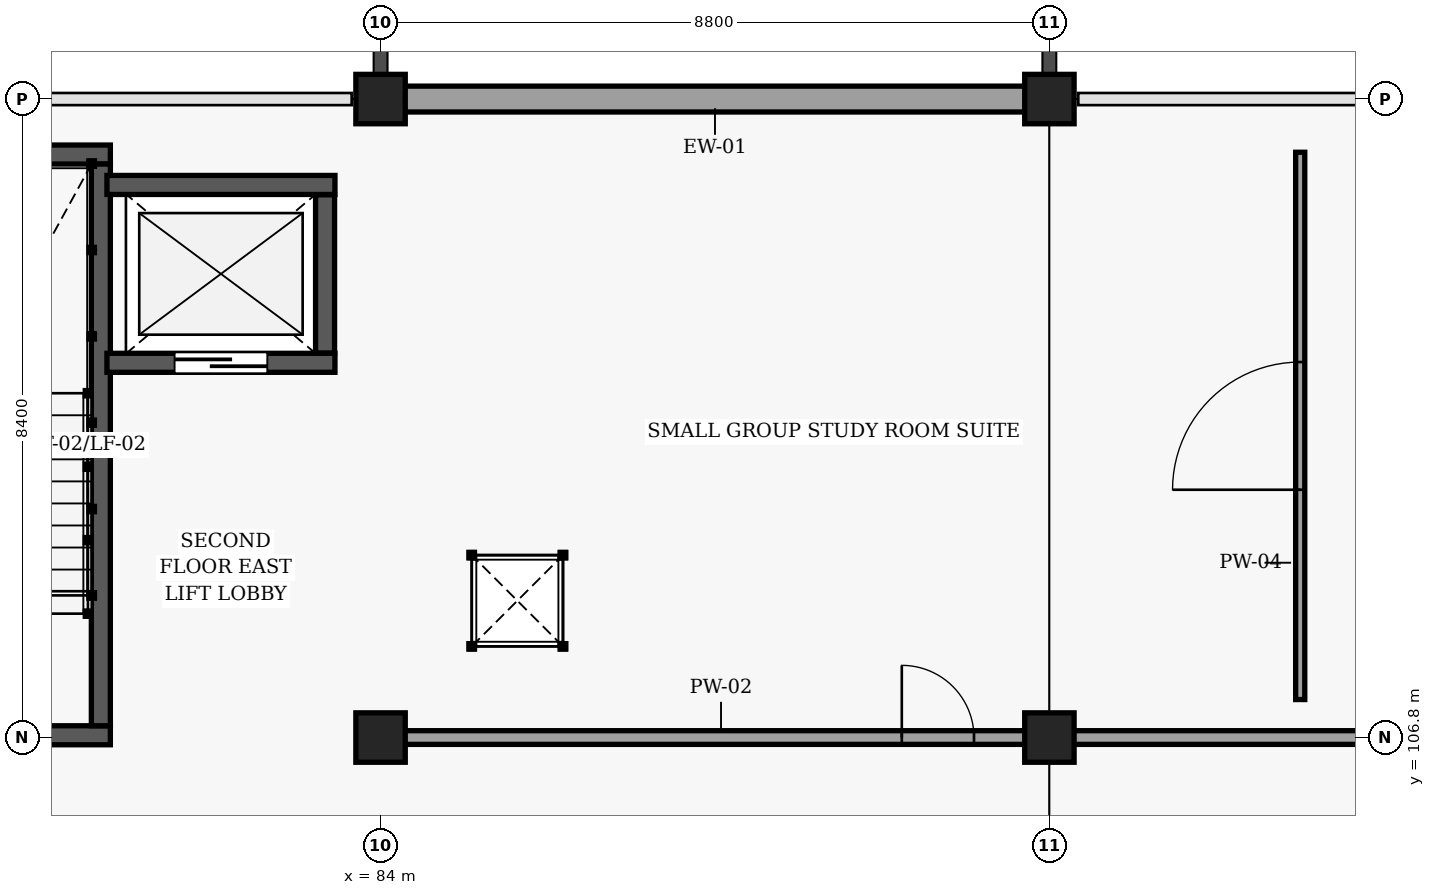
"""IFC4 building model, lengths in metres.
Left out: names, types, materials, properties, quantities, classifications, styles, units other than length and angle.
Written with IfcOpenShell. Run it as: python <this file> out.ifc"""

import sys

from ifc_helpers import new_model, si_unit, direction, frame, frame_2d, origin, origin_2d, place, context, subcontext, project, spatial, rectangle, extrude, element, fill, save


model = new_model("IFC4")
c1 = context("Model", 3, precision=1e-05, world=origin(), true_north=direction((0.0, 1.0)))
c2 = subcontext(c1, "Body", "Model", "MODEL_VIEW")
j1 = project(units=[si_unit("LENGTHUNIT", "METRE"), si_unit("PLANEANGLEUNIT", "RADIAN")], contexts=[c1])
p1 = place(None, origin())
s1 = spatial("IfcSite", under=j1, at=p1, CompositionType="ELEMENT")
p2 = place(p1, origin())
s2 = spatial("IfcBuilding", under=s1, at=p2, CompositionType="ELEMENT")
p3 = place(p2, frame((0.0, 0.0, 9.0)))
s3 = spatial("IfcBuildingStorey", under=s2, at=p3, CompositionType="ELEMENT", Elevation=9.0)
for number, where, z_axis, x_axis in (
    (1, (84.0, 106.8, 0.0), (0.0, 0.0, 1.0), (1.0, 0.0, 0.0)),
    (2, (84.0, 115.2, 0.0), (0.0, 0.0, 1.0), (1.0, 0.0, 0.0)),
    (3, (92.8, 106.8, 0.0), (0.0, 0.0, 1.0), (1.0, 0.0, 0.0)),
    (4, (92.8, 115.2, 0.0), (0.0, 0.0, 1.0), (1.0, 0.0, 0.0)),
):
    element("IfcColumn", number, at=place(p3, frame(where, z_axis=z_axis, x_axis=x_axis)), inside=s3, PredefinedType="COLUMN", context=c2, shape_type="SweptSolid", body=[
        extrude(rectangle(XDim=0.65, YDim=0.65, at=origin_2d()), origin(), (0.0, 0.0, 1.0), 3.9),
    ])
p4 = place(p3, frame((84.1, 115.2, 0.0), z_axis=(0.0, 0.0, 1.0), x_axis=(1.0, 0.0, 0.0)))
e5 = element("IfcWall", 5, at=p4, inside=s3, PredefinedType="SOLIDWALL", context=c2, shape_type="SweptSolid", body=[
    extrude(rectangle(XDim=8.6, YDim=0.34, at=frame_2d((4.3, 0.0))), origin(), (0.0, 0.0, 1.0), 2.845),
])
p5 = place(p3, frame((80.445, 106.83, 0.0), z_axis=(0.0, 0.0, 1.0), x_axis=(-1.0, 0.0, 0.0)))
e6 = element("IfcWall", 6, at=p5, inside=s3, PredefinedType="SHEAR", context=c2, shape_type="SweptSolid", body=[
    extrude(rectangle(XDim=3.61, YDim=0.25, at=frame_2d((1.805, 0.0))), origin(), (0.0, 0.0, 1.0), 3.66),
])
p6 = place(p5, frame((1.235, 0.0, 0.0)))
e7 = element("IfcOpeningElement", 7, at=p6, cuts=e6, PredefinedType="OPENING", context=c2, shape_type="SweptSolid", body=[
    extrude(rectangle(XDim=1.14, YDim=2.15, at=frame_2d((0.57, 1.075))), frame((0.0, 0.135, 0.0), z_axis=(0.0, -1.0, 0.0), x_axis=(1.0, 0.0, 0.0)), (0.0, 0.0, 1.0), 0.27),
])
p7 = place(p3, frame((76.835, 114.47, 0.0), z_axis=(0.0, 0.0, 1.0), x_axis=(1.0, 0.0, 0.0)))
e8 = element("IfcWall", 8, at=p7, inside=s3, PredefinedType="SHEAR", context=c2, shape_type="SweptSolid", body=[
    extrude(rectangle(XDim=3.61, YDim=0.25, at=frame_2d((1.805, 0.0))), origin(), (0.0, 0.0, 1.0), 3.66),
])
p8 = place(p3, frame((80.32, 114.345, 0.0), z_axis=(0.0, 0.0, 1.0), x_axis=(0.0, -1.0, 0.0)))
e9 = element("IfcWall", 9, at=p8, inside=s3, PredefinedType="SHEAR", context=c2, shape_type="SweptSolid", body=[
    extrude(rectangle(XDim=7.39, YDim=0.25, at=frame_2d((3.695, 0.0))), origin(), (0.0, 0.0, 1.0), 3.66),
])
p9 = place(p3, frame((80.4, 111.73, 0.0), z_axis=(0.0, 0.0, 1.0), x_axis=(1.0, 0.0, 0.0)))
e10 = element("IfcWall", 10, at=p9, inside=s3, PredefinedType="SHEAR", context=c2, shape_type="SweptSolid", body=[
    extrude(rectangle(XDim=3.0, YDim=0.25, at=frame_2d((1.5, 0.0))), origin(), (0.0, 0.0, 1.0), 3.66),
])
p10 = place(p9, frame((0.89, 0.0, 0.0)))
e11 = element("IfcOpeningElement", 11, at=p10, cuts=e10, PredefinedType="OPENING", context=c2, shape_type="SweptSolid", body=[
    extrude(rectangle(XDim=1.22, YDim=2.18, at=frame_2d((0.61, 1.09))), frame((0.0, 0.135, 0.0), z_axis=(0.0, -1.0, 0.0), x_axis=(1.0, 0.0, 0.0)), (0.0, 0.0, 1.0), 0.27),
])
p11 = place(p3, frame((83.4, 114.07, 0.0), z_axis=(0.0, 0.0, 1.0), x_axis=(-1.0, 0.0, 0.0)))
e12 = element("IfcWall", 12, at=p11, inside=s3, PredefinedType="SHEAR", context=c2, shape_type="SweptSolid", body=[
    extrude(rectangle(XDim=3.0, YDim=0.25, at=frame_2d((1.5, 0.0))), origin(), (0.0, 0.0, 1.0), 3.66),
])
p12 = place(p3, frame((83.27, 111.86, 0.0), z_axis=(0.0, 0.0, 1.0), x_axis=(0.0, 1.0, 0.0)))
e13 = element("IfcWall", 13, at=p12, inside=s3, PredefinedType="SHEAR", context=c2, shape_type="SweptSolid", body=[
    extrude(rectangle(XDim=2.08, YDim=0.25, at=frame_2d((1.04, 0.0))), origin(), (0.0, 0.0, 1.0), 3.66),
])
p13 = place(p3, frame((84.2, 106.8, 0.0), z_axis=(0.0, 0.0, 1.0), x_axis=(1.0, 0.0, 0.0)))
e14 = element("IfcWall", 14, at=p13, inside=s3, PredefinedType="PARTITIONING", context=c2, shape_type="SweptSolid", body=[
    extrude(rectangle(XDim=28.53, YDim=0.18, at=frame_2d((14.265, 0.0))), origin(), (0.0, 0.0, 1.0), 2.845),
])
p14 = place(p13, frame((6.658, 0.0, 0.0)))
e15 = element("IfcOpeningElement", 15, at=p14, cuts=e14, PredefinedType="OPENING", context=c2, shape_type="SweptSolid", body=[
    extrude(rectangle(XDim=0.95, YDim=2.12, at=frame_2d((0.475, 1.06))), frame((0.0, 0.1, 0.0), z_axis=(0.0, -1.0, 0.0), x_axis=(1.0, 0.0, 0.0)), (0.0, 0.0, 1.0), 0.2),
])
p15 = place(p13, frame((13.805, 0.0, 0.0)))
e16 = element("IfcOpeningElement", 16, at=p15, cuts=e14, PredefinedType="OPENING", context=c2, shape_type="SweptSolid", body=[
    extrude(rectangle(XDim=0.92, YDim=2.1, at=frame_2d((0.46, 1.05))), frame((0.0, 0.1, 0.0), z_axis=(0.0, -1.0, 0.0), x_axis=(1.0, 0.0, 0.0)), (0.0, 0.0, 1.0), 0.2),
])
p16 = place(p13, frame((20.917, 0.0, 0.0)))
e17 = element("IfcOpeningElement", 17, at=p16, cuts=e14, PredefinedType="OPENING", context=c2, shape_type="SweptSolid", body=[
    extrude(rectangle(XDim=0.96, YDim=2.08, at=frame_2d((0.48, 1.04))), frame((0.0, 0.1, 0.0), z_axis=(0.0, -1.0, 0.0), x_axis=(1.0, 0.0, 0.0)), (0.0, 0.0, 1.0), 0.2),
])
p17 = place(p3, frame((96.1, 107.3, 0.0), z_axis=(0.0, 0.0, 1.0), x_axis=(0.0, 1.0, 0.0)))
e18 = element("IfcWall", 18, at=p17, inside=s3, PredefinedType="PARTITIONING", context=c2, shape_type="SweptSolid", body=[
    extrude(rectangle(XDim=7.2, YDim=0.12, at=frame_2d((3.6, 0.0))), origin(), (0.0, 0.0, 1.0), 3.645),
])
p18 = place(p17, frame((2.76, 0.0, 0.0)))
e19 = element("IfcOpeningElement", 19, at=p18, cuts=e18, PredefinedType="OPENING", context=c2, shape_type="SweptSolid", body=[
    extrude(rectangle(XDim=1.68, YDim=2.26, at=frame_2d((0.84, 1.13))), frame((0.0, 0.07, 0.0), z_axis=(0.0, -1.0, 0.0), x_axis=(1.0, 0.0, 0.0)), (0.0, 0.0, 1.0), 0.14),
])
p19 = place(p10, origin())
e20 = element("IfcDoor", 20, at=p19, inside=s3, OperationType="SLIDING_TO_RIGHT", PredefinedType="DOOR", context=c2, shape_type="SweptSolid", body=[
    extrude(rectangle(XDim=1.22, YDim=2.18, at=frame_2d((0.61, 1.09))), frame((0.0, 0.025, 0.0), z_axis=(0.0, -1.0, 0.0), x_axis=(1.0, 0.0, 0.0)), (0.0, 0.0, 1.0), 0.05),
])
fill(e11, e20)
p20 = place(p14, origin())
e21 = element("IfcDoor", 21, at=p20, inside=s3, OperationType="SINGLE_SWING_LEFT", PredefinedType="DOOR", context=c2, shape_type="SweptSolid", body=[
    extrude(rectangle(XDim=0.95, YDim=2.12, at=frame_2d((0.475, 1.06))), frame((0.0, 0.025, 0.0), z_axis=(0.0, -1.0, 0.0), x_axis=(1.0, 0.0, 0.0)), (0.0, 0.0, 1.0), 0.05),
])
fill(e15, e21)
p21 = place(p18, origin())
e22 = element("IfcDoor", 22, at=p21, inside=s3, OperationType="DOUBLE_DOOR_SINGLE_SWING", PredefinedType="DOOR", context=c2, shape_type="SweptSolid", body=[
    extrude(rectangle(XDim=1.68, YDim=2.26, at=frame_2d((0.84, 1.13))), frame((0.0, 0.025, 0.0), z_axis=(0.0, -1.0, 0.0), x_axis=(1.0, 0.0, 0.0)), (0.0, 0.0, 1.0), 0.05),
])
fill(e19, e22)
save(model, sys.argv[1])
